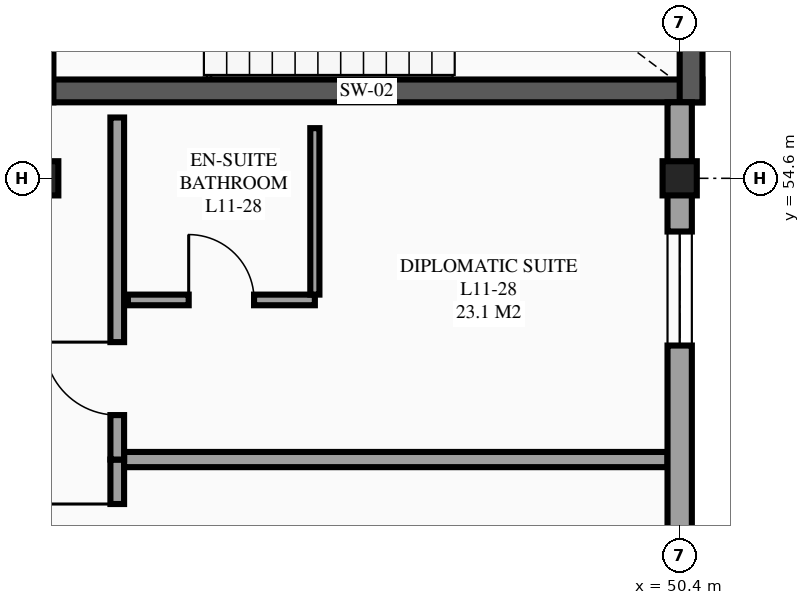
"""IFC4 building model, lengths in metres.
Left out: names, types, materials, properties, quantities, classifications, styles, units other than length and angle.
Written with IfcOpenShell. Run it as: python <this file> out.ifc"""

import sys

from ifc_helpers import new_model, si_unit, direction, frame, frame_2d, origin, origin_2d, place, context, subcontext, project, spatial, rectangle, extrude, element, fill, save


model = new_model("IFC4")
c1 = context("Model", 3, precision=1e-05, world=origin(), true_north=direction((0.0, 1.0)))
c2 = subcontext(c1, "Body", "Model", "MODEL_VIEW")
j1 = project(units=[si_unit("LENGTHUNIT", "METRE"), si_unit("PLANEANGLEUNIT", "RADIAN")], contexts=[c1])
p1 = place(None, origin())
s1 = spatial("IfcSite", under=j1, at=p1, CompositionType="ELEMENT")
p2 = place(p1, origin())
s2 = spatial("IfcBuilding", under=s1, at=p2, CompositionType="ELEMENT")
p3 = place(p2, frame((0.0, 0.0, 43.5)))
s3 = spatial("IfcBuildingStorey", under=s2, at=p3, CompositionType="ELEMENT", Elevation=43.5)
for number, where, z_axis, x_axis in (
    (1, (42.0, 54.6, 0.0), (0.0, 0.0, 1.0), (1.0, 0.0, 0.0)),
    (2, (50.4, 54.6, 0.0), (0.0, 0.0, 1.0), (1.0, 0.0, 0.0)),
):
    element("IfcColumn", number, at=place(p3, frame(where, z_axis=z_axis, x_axis=x_axis)), inside=s3, PredefinedType="COLUMN", context=c2, shape_type="SweptSolid", body=[
        extrude(rectangle(XDim=0.45, YDim=0.45, at=origin_2d()), origin(), (0.0, 0.0, 1.0), 3.6),
    ])
p4 = place(p3, frame((41.86, 55.75, 0.0), z_axis=(0.0, 0.0, 1.0), x_axis=(1.0, 0.0, 0.0)))
e3 = element("IfcWall", 3, at=p4, inside=s3, PredefinedType="SHEAR", context=c2, shape_type="SweptSolid", body=[
    extrude(rectangle(XDim=8.84, YDim=0.3, at=frame_2d((4.42, 0.0))), origin(), (0.0, 0.0, 1.0), 3.6),
])
p5 = place(p3, frame((50.55, 55.6, 0.0), z_axis=(0.0, 0.0, 1.0), x_axis=(0.0, 1.0, 0.0)))
e4 = element("IfcWall", 4, at=p5, inside=s3, PredefinedType="SHEAR", context=c2, shape_type="SweptSolid", body=[
    extrude(rectangle(XDim=5.2, YDim=0.3, at=frame_2d((2.6, 0.0))), origin(), (0.0, 0.0, 1.0), 3.6),
])
p6 = place(p3, frame((42.01, 60.8, 0.0), z_axis=(0.0, 0.0, 1.0), x_axis=(0.0, -1.0, 0.0)))
e5 = element("IfcWall", 5, at=p6, inside=s3, PredefinedType="SHEAR", context=c2, shape_type="SweptSolid", body=[
    extrude(rectangle(XDim=5.2, YDim=0.3, at=frame_2d((2.6, 0.0))), origin(), (0.0, 0.0, 1.0), 3.6),
])
p7 = place(p6, frame((3.0, 0.0, 0.0)))
e6 = element("IfcOpeningElement", 6, at=p7, cuts=e5, PredefinedType="OPENING", context=c2, shape_type="SweptSolid", body=[
    extrude(rectangle(XDim=1.15, YDim=2.15, at=frame_2d((0.575, 1.075))), frame((0.0, 0.16, 0.0), z_axis=(0.0, -1.0, 0.0), x_axis=(1.0, 0.0, 0.0)), (0.0, 0.0, 1.0), 0.32),
])
p8 = place(p3, frame((43.0, 46.4, 0.0), z_axis=(0.0, 0.0, 1.0), x_axis=(0.0, 1.0, 0.0)))
e7 = element("IfcWall", 7, at=p8, inside=s3, PredefinedType="PARTITIONING", context=c2, shape_type="SweptSolid", body=[
    extrude(rectangle(XDim=4.5, YDim=0.18, at=frame_2d((2.25, 0.0))), origin(), (0.0, 0.0, 1.0), 3.355),
])
p9 = place(p8, frame((2.955, 0.0, 0.0)))
e8 = element("IfcOpeningElement", 8, at=p9, cuts=e7, PredefinedType="OPENING", context=c2, shape_type="SweptSolid", body=[
    extrude(rectangle(XDim=0.96, YDim=2.15, at=frame_2d((0.48, 1.075))), frame((0.0, 0.1, 0.0), z_axis=(0.0, -1.0, 0.0), x_axis=(1.0, 0.0, 0.0)), (0.0, 0.0, 1.0), 0.2),
])
p10 = place(p3, frame((43.09, 50.9, 0.0), z_axis=(0.0, 0.0, 1.0), x_axis=(1.0, 0.0, 0.0)))
e9 = element("IfcWall", 9, at=p10, inside=s3, PredefinedType="PARTITIONING", context=c2, shape_type="SweptSolid", body=[
    extrude(rectangle(XDim=7.15, YDim=0.2, at=frame_2d((3.575, 0.0))), origin(), (0.0, 0.0, 1.0), 3.355),
])
p11 = place(p3, frame((43.0, 50.9, 0.0), z_axis=(0.0, 0.0, 1.0), x_axis=(0.0, 1.0, 0.0)))
e10 = element("IfcWall", 10, at=p11, inside=s3, PredefinedType="PARTITIONING", context=c2, shape_type="SweptSolid", body=[
    extrude(rectangle(XDim=4.5, YDim=0.18, at=frame_2d((2.25, 0.0))), origin(), (0.0, 0.0, 1.0), 3.355),
])
p12 = place(p11, frame((0.585, 0.0, 0.0)))
e11 = element("IfcOpeningElement", 11, at=p12, cuts=e10, PredefinedType="OPENING", context=c2, shape_type="SweptSolid", body=[
    extrude(rectangle(XDim=0.96, YDim=2.15, at=frame_2d((0.48, 1.075))), frame((0.0, 0.1, 0.0), z_axis=(0.0, -1.0, 0.0), x_axis=(1.0, 0.0, 0.0)), (0.0, 0.0, 1.0), 0.2),
])
p13 = place(p3, frame((43.14, 53.0, 0.0), z_axis=(0.0, 0.0, 1.0), x_axis=(1.0, 0.0, 0.0)))
e12 = element("IfcWall", 12, at=p13, inside=s3, PredefinedType="PARTITIONING", context=c2, shape_type="SweptSolid", body=[
    extrude(rectangle(XDim=2.46, YDim=0.14, at=frame_2d((1.23, 0.0))), origin(), (0.0, 0.0, 1.0), 3.355),
])
p14 = place(p13, frame((0.8, 0.0, 0.0)))
e13 = element("IfcOpeningElement", 13, at=p14, cuts=e12, PredefinedType="OPENING", context=c2, shape_type="SweptSolid", body=[
    extrude(rectangle(XDim=0.86, YDim=2.1, at=frame_2d((0.43, 1.05))), frame((0.0, 0.08, 0.0), z_axis=(0.0, -1.0, 0.0), x_axis=(1.0, 0.0, 0.0)), (0.0, 0.0, 1.0), 0.16),
])
p15 = place(p3, frame((45.6, 53.07, 0.0), z_axis=(0.0, 0.0, 1.0), x_axis=(0.0, 1.0, 0.0)))
e14 = element("IfcWall", 14, at=p15, inside=s3, PredefinedType="PARTITIONING", context=c2, shape_type="SweptSolid", body=[
    extrude(rectangle(XDim=2.19, YDim=0.12, at=frame_2d((1.095, 0.0))), origin(), (0.0, 0.0, 1.0), 3.355),
])
p16 = place(p3, frame((50.4, 46.2, 0.0), z_axis=(0.0, 0.0, 1.0), x_axis=(0.0, 1.0, 0.0)))
e15 = element("IfcWall", 15, at=p16, inside=s3, PredefinedType="STANDARD", context=c2, shape_type="SweptSolid", body=[
    extrude(rectangle(XDim=8.4, YDim=0.32, at=frame_2d((4.2, 0.0))), origin(), (0.0, 0.0, 1.0), 3.05),
])
p17 = place(p16, frame((1.7, 0.0, 0.85)))
e16 = element("IfcOpeningElement", 16, at=p17, cuts=e15, PredefinedType="OPENING", context=c2, shape_type="SweptSolid", body=[
    extrude(rectangle(XDim=1.5, YDim=1.5, at=frame_2d((0.75, 0.75))), frame((0.0, 0.17, 0.0), z_axis=(0.0, -1.0, 0.0), x_axis=(1.0, 0.0, 0.0)), (0.0, 0.0, 1.0), 0.34),
])
p18 = place(p16, frame((6.2, 0.0, 0.85)))
e17 = element("IfcOpeningElement", 17, at=p18, cuts=e15, PredefinedType="OPENING", context=c2, shape_type="SweptSolid", body=[
    extrude(rectangle(XDim=1.5, YDim=1.5, at=frame_2d((0.75, 0.75))), frame((0.0, 0.17, 0.0), z_axis=(0.0, -1.0, 0.0), x_axis=(1.0, 0.0, 0.0)), (0.0, 0.0, 1.0), 0.34),
])
p19 = place(p3, frame((50.4, 54.6, 0.0), z_axis=(0.0, 0.0, 1.0), x_axis=(0.0, 1.0, 0.0)))
e18 = element("IfcWall", 18, at=p19, inside=s3, PredefinedType="STANDARD", context=c2, shape_type="SweptSolid", body=[
    extrude(rectangle(XDim=1.0, YDim=0.32, at=frame_2d((0.5, 0.0))), origin(), (0.0, 0.0, 1.0), 2.71),
])
p20 = place(p18, origin())
e19 = element("IfcWindow", 19, at=p20, inside=s3, PartitioningType="SINGLE_PANEL", PredefinedType="WINDOW", context=c2, shape_type="SweptSolid", body=[
    extrude(rectangle(XDim=1.5, YDim=1.5, at=frame_2d((0.75, 0.75))), frame((0.0, 0.03, 0.0), z_axis=(0.0, -1.0, 0.0), x_axis=(1.0, 0.0, 0.0)), (0.0, 0.0, 1.0), 0.06),
])
fill(e17, e19)
p21 = place(p9, origin())
e20 = element("IfcDoor", 20, at=p21, inside=s3, OperationType="SINGLE_SWING_RIGHT", PredefinedType="DOOR", context=c2, shape_type="SweptSolid", body=[
    extrude(rectangle(XDim=0.96, YDim=2.15, at=frame_2d((0.48, 1.075))), frame((0.0, 0.025, 0.0), z_axis=(0.0, -1.0, 0.0), x_axis=(1.0, 0.0, 0.0)), (0.0, 0.0, 1.0), 0.05),
])
fill(e8, e20)
p22 = place(p12, origin())
e21 = element("IfcDoor", 21, at=p22, inside=s3, OperationType="SINGLE_SWING_RIGHT", PredefinedType="DOOR", context=c2, shape_type="SweptSolid", body=[
    extrude(rectangle(XDim=0.96, YDim=2.15, at=frame_2d((0.48, 1.075))), frame((0.0, 0.025, 0.0), z_axis=(0.0, -1.0, 0.0), x_axis=(1.0, 0.0, 0.0)), (0.0, 0.0, 1.0), 0.05),
])
fill(e11, e21)
p23 = place(p14, origin())
e22 = element("IfcDoor", 22, at=p23, inside=s3, OperationType="SINGLE_SWING_LEFT", PredefinedType="DOOR", context=c2, shape_type="SweptSolid", body=[
    extrude(rectangle(XDim=0.86, YDim=2.1, at=frame_2d((0.43, 1.05))), frame((0.0, 0.025, 0.0), z_axis=(0.0, -1.0, 0.0), x_axis=(1.0, 0.0, 0.0)), (0.0, 0.0, 1.0), 0.05),
])
fill(e13, e22)
save(model, sys.argv[1])
